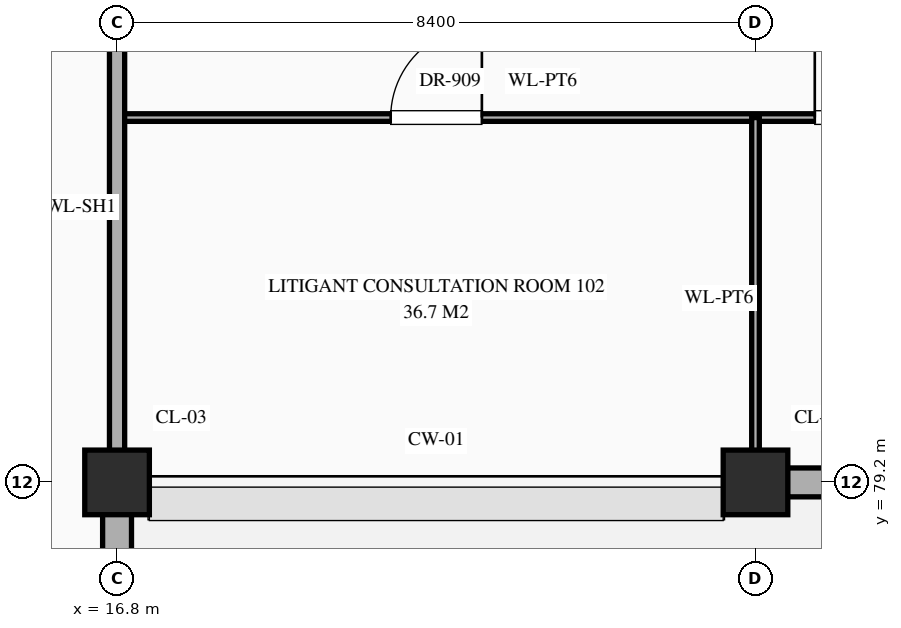
"""IFC4 building model, lengths in metres.
Left out: names, types, materials, properties, quantities, classifications, styles, units other than length and angle.
Written with IfcOpenShell. Run it as: python <this file> out.ifc"""

import sys

from ifc_helpers import new_model, si_unit, direction, frame, frame_2d, origin, origin_2d, place, context, subcontext, project, spatial, rectangle, extrude, element, fill, save


model = new_model("IFC4")
c1 = context("Model", 3, precision=1e-05, world=origin(), true_north=direction((0.0, 1.0)))
c2 = subcontext(c1, "Body", "Model", "MODEL_VIEW")
j1 = project(units=[si_unit("LENGTHUNIT", "METRE"), si_unit("PLANEANGLEUNIT", "RADIAN")], contexts=[c1])
p1 = place(None, origin())
s1 = spatial("IfcSite", under=j1, at=p1, CompositionType="ELEMENT")
p2 = place(p1, origin())
s2 = spatial("IfcBuilding", under=s1, at=p2, CompositionType="ELEMENT")
p3 = place(p2, origin())
s3 = spatial("IfcBuildingStorey", under=s2, at=p3, CompositionType="ELEMENT", Elevation=0.0)
for number, where, z_axis, x_axis in (
    (1, (16.8, 79.2, 0.0), (0.0, 0.0, 1.0), (1.0, 0.0, 0.0)),
    (2, (25.2, 79.2, 0.0), (0.0, 0.0, 1.0), (1.0, 0.0, 0.0)),
):
    element("IfcColumn", number, at=place(p3, frame(where, z_axis=z_axis, x_axis=x_axis)), inside=s3, PredefinedType="COLUMN", context=c2, shape_type="SweptSolid", body=[
        extrude(rectangle(XDim=0.85, YDim=0.85, at=origin_2d()), origin(), (0.0, 0.0, 1.0), 5.4),
    ])
p4 = place(p3, frame((16.8, 72.42, 0.0), z_axis=(0.0, 0.0, 1.0), x_axis=(0.0, 1.0, 0.0)))
e3 = element("IfcWall", 3, at=p4, inside=s3, PredefinedType="STANDARD", context=c2, shape_type="SweptSolid", body=[
    extrude(rectangle(XDim=6.36, YDim=0.38, at=frame_2d((3.18, 0.0))), origin(), (0.0, 0.0, 1.0), 4.47),
])
p5 = place(p3, frame((25.62, 79.2, 0.0), z_axis=(0.0, 0.0, 1.0), x_axis=(1.0, 0.0, 0.0)))
e4 = element("IfcWall", 4, at=p5, inside=s3, PredefinedType="STANDARD", context=c2, shape_type="SweptSolid", body=[
    extrude(rectangle(XDim=7.56, YDim=0.38, at=frame_2d((3.78, 0.0))), origin(), (0.0, 0.0, 1.0), 4.47),
])
p6 = place(p5, frame((3.18, 0.0, 0.0)))
e5 = element("IfcOpeningElement", 5, at=p6, cuts=e4, PredefinedType="OPENING", context=c2, shape_type="SweptSolid", body=[
    extrude(rectangle(XDim=1.2, YDim=2.2, at=frame_2d((0.6, 1.1))), frame((0.0, 0.202, 0.0), z_axis=(0.0, -1.0, 0.0), x_axis=(1.0, 0.0, 0.0)), (0.0, 0.0, 1.0), 0.404),
])
p7 = place(p3, frame((16.8, 84.0, 0.0), z_axis=(0.0, 0.0, 1.0), x_axis=(1.0, 0.0, 0.0)))
e6 = element("IfcWall", 6, at=p7, inside=s3, PredefinedType="STANDARD", context=c2, shape_type="SweptSolid", body=[
    extrude(rectangle(XDim=11.2, YDim=0.1, at=frame_2d((5.6, 0.0))), origin(), (0.0, 0.0, 1.0), 5.12),
])
p8 = place(p7, frame((3.6, 0.0, 0.0)))
e7 = element("IfcOpeningElement", 7, at=p8, cuts=e6, PredefinedType="OPENING", context=c2, shape_type="SweptSolid", body=[
    extrude(rectangle(XDim=1.2, YDim=2.35, at=frame_2d((0.6, 1.175))), frame((0.0, 0.062, 0.0), z_axis=(0.0, -1.0, 0.0), x_axis=(1.0, 0.0, 0.0)), (0.0, 0.0, 1.0), 0.124),
])
p9 = place(p7, frame((9.18, 0.0, 0.0)))
e8 = element("IfcOpeningElement", 8, at=p9, cuts=e6, PredefinedType="OPENING", context=c2, shape_type="SweptSolid", body=[
    extrude(rectangle(XDim=1.24, YDim=2.3, at=frame_2d((0.62, 1.15))), frame((0.0, 0.062, 0.0), z_axis=(0.0, -1.0, 0.0), x_axis=(1.0, 0.0, 0.0)), (0.0, 0.0, 1.0), 0.124),
])
p10 = place(p3, frame((16.8, 79.24, 0.0), z_axis=(0.0, 0.0, 1.0), x_axis=(0.0, 1.0, 0.0)))
e9 = element("IfcWall", 9, at=p10, inside=s3, PredefinedType="STANDARD", context=c2, shape_type="SweptSolid", body=[
    extrude(rectangle(XDim=7.16, YDim=0.2, at=frame_2d((3.58, 0.0))), origin(), (0.0, 0.0, 1.0), 4.37),
])
p11 = place(p3, frame((25.2, 79.24, 0.0), z_axis=(0.0, 0.0, 1.0), x_axis=(0.0, 1.0, 0.0)))
e10 = element("IfcWall", 10, at=p11, inside=s3, PredefinedType="STANDARD", context=c2, shape_type="SweptSolid", body=[
    extrude(rectangle(XDim=4.76, YDim=0.1, at=frame_2d((2.38, 0.0))), origin(), (0.0, 0.0, 1.0), 4.37),
])
p12 = place(p8, origin())
e11 = element("IfcDoor", 11, at=p12, inside=s3, OperationType="SINGLE_SWING_RIGHT", PredefinedType="DOOR", context=c2, shape_type="SweptSolid", body=[
    extrude(rectangle(XDim=1.2, YDim=2.35, at=frame_2d((0.6, 1.175))), frame((0.0, 0.025, 0.0), z_axis=(0.0, -1.0, 0.0), x_axis=(1.0, 0.0, 0.0)), (0.0, 0.0, 1.0), 0.05),
])
fill(e7, e11)
p13 = place(p9, origin())
e12 = element("IfcDoor", 12, at=p13, inside=s3, OperationType="SINGLE_SWING_LEFT", PredefinedType="DOOR", context=c2, shape_type="SweptSolid", body=[
    extrude(rectangle(XDim=1.24, YDim=2.3, at=frame_2d((0.62, 1.15))), frame((0.0, 0.025, 0.0), z_axis=(0.0, -1.0, 0.0), x_axis=(1.0, 0.0, 0.0)), (0.0, 0.0, 1.0), 0.05),
])
fill(e8, e12)
save(model, sys.argv[1])
